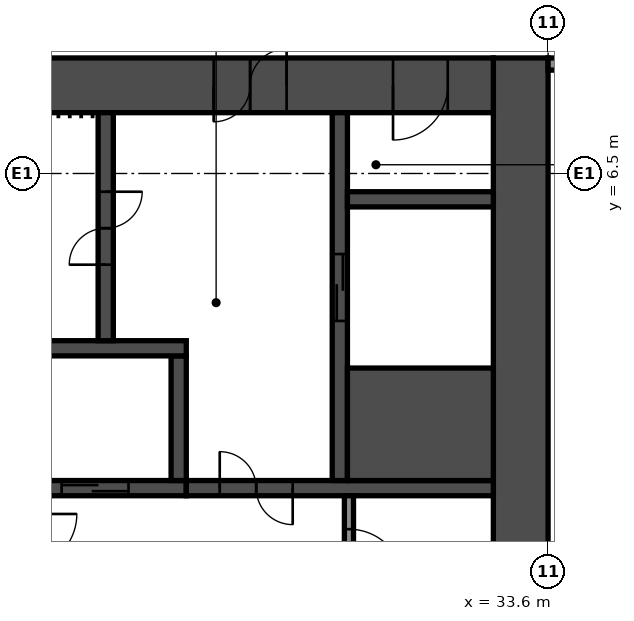
"""IFC4 building model, lengths in metres.
Left out: names, types, materials, properties, quantities, classifications, styles, units other than length and angle.
Written with IfcOpenShell. Run it as: python <this file> out.ifc"""

import sys

from ifc_helpers import new_model, si_unit, direction, frame, frame_2d, origin, place, context, subcontext, project, spatial, rectangle, extrude, element, fill, save


model = new_model("IFC4")
c1 = context("Model", 3, precision=1e-05, world=origin(), true_north=direction((0.0, 1.0)))
c2 = subcontext(c1, "Body", "Model", "MODEL_VIEW")
j1 = project(units=[si_unit("LENGTHUNIT", "METRE"), si_unit("PLANEANGLEUNIT", "RADIAN")], contexts=[c1])
p1 = place(None, origin())
s1 = spatial("IfcSite", under=j1, at=p1, CompositionType="ELEMENT")
p2 = place(p1, origin())
s2 = spatial("IfcBuilding", under=s1, at=p2, CompositionType="ELEMENT")
p3 = place(p2, frame((0.0, 0.0, 110.6)))
s3 = spatial("IfcBuildingStorey", under=s2, at=p3, CompositionType="ELEMENT", Elevation=110.6)
p4 = place(p3, frame((33.15, -8.4, 0.0), z_axis=(0.0, 0.0, 1.0), x_axis=(0.0, 1.0, 0.0)))
e1 = element("IfcWall", 1, at=p4, inside=s3, PredefinedType="SHEAR", context=c2, shape_type="SweptSolid", body=[
    extrude(rectangle(XDim=16.8, YDim=0.9, at=frame_2d((8.4, 0.0))), origin(), (0.0, 0.0, 1.0), 2.8),
])
p5 = place(p3, frame((17.7, 7.95, 0.0), z_axis=(0.0, 0.0, 1.0), x_axis=(1.0, 0.0, 0.0)))
e2 = element("IfcWall", 2, at=p5, inside=s3, PredefinedType="SHEAR", context=c2, shape_type="SweptSolid", body=[
    extrude(rectangle(XDim=15.0, YDim=0.9, at=frame_2d((7.5, 0.0))), origin(), (0.0, 0.0, 1.0), 2.8),
])
p6 = place(p5, frame((10.4, 0.0, 0.0)))
e3 = element("IfcOpeningElement", 3, at=p6, cuts=e2, PredefinedType="OPENING", context=c2, shape_type="SweptSolid", body=[
    extrude(rectangle(XDim=1.2, YDim=2.1, at=frame_2d((0.6, 1.05))), frame((0.0, 0.46, 0.0), z_axis=(0.0, -1.0, 0.0), x_axis=(1.0, 0.0, 0.0)), (0.0, 0.0, 1.0), 0.92),
])
p7 = place(p5, frame((13.35, 0.0, 0.0)))
e4 = element("IfcOpeningElement", 4, at=p7, cuts=e2, PredefinedType="OPENING", context=c2, shape_type="SweptSolid", body=[
    extrude(rectangle(XDim=0.9, YDim=2.1, at=frame_2d((0.45, 1.05))), frame((0.0, 0.46, 0.0), z_axis=(0.0, -1.0, 0.0), x_axis=(1.0, 0.0, 0.0)), (0.0, 0.0, 1.0), 0.92),
])
p8 = place(p3, frame((20.15, 1.325, 0.0), z_axis=(0.0, 0.0, 1.0), x_axis=(1.0, 0.0, 0.0)))
e5 = element("IfcWall", 5, at=p8, inside=s3, PredefinedType="SHEAR", context=c2, shape_type="SweptSolid", body=[
    extrude(rectangle(XDim=7.5, YDim=0.25, at=frame_2d((3.75, 0.0))), origin(), (0.0, 0.0, 1.0), 2.8),
])
p9 = place(p8, frame((0.65, 0.0, 0.0)))
e6 = element("IfcOpeningElement", 6, at=p9, cuts=e5, PredefinedType="OPENING", context=c2, shape_type="SweptSolid", body=[
    extrude(rectangle(XDim=1.1, YDim=2.1, at=frame_2d((0.55, 1.05))), frame((0.0, 0.135, 0.0), z_axis=(0.0, -1.0, 0.0), x_axis=(1.0, 0.0, 0.0)), (0.0, 0.0, 1.0), 0.27),
])
p10 = place(p8, frame((3.05, 0.0, 0.0)))
e7 = element("IfcOpeningElement", 7, at=p10, cuts=e5, PredefinedType="OPENING", context=c2, shape_type="SweptSolid", body=[
    extrude(rectangle(XDim=1.1, YDim=2.1, at=frame_2d((0.55, 1.05))), frame((0.0, 0.135, 0.0), z_axis=(0.0, -1.0, 0.0), x_axis=(1.0, 0.0, 0.0)), (0.0, 0.0, 1.0), 0.27),
])
p11 = place(p8, frame((5.45, 0.0, 0.0)))
e8 = element("IfcOpeningElement", 8, at=p11, cuts=e5, PredefinedType="OPENING", context=c2, shape_type="SweptSolid", body=[
    extrude(rectangle(XDim=1.1, YDim=2.1, at=frame_2d((0.55, 1.05))), frame((0.0, 0.135, 0.0), z_axis=(0.0, -1.0, 0.0), x_axis=(1.0, 0.0, 0.0)), (0.0, 0.0, 1.0), 0.27),
])
p12 = place(p3, frame((27.525, 1.45, 0.0), z_axis=(0.0, 0.0, 1.0), x_axis=(0.0, 1.0, 0.0)))
e9 = element("IfcWall", 9, at=p12, inside=s3, PredefinedType="SHEAR", context=c2, shape_type="SweptSolid", body=[
    extrude(rectangle(XDim=2.05, YDim=0.25, at=frame_2d((1.025, 0.0))), origin(), (0.0, 0.0, 1.0), 2.8),
])
p13 = place(p3, frame((20.15, 3.625, 0.0), z_axis=(0.0, 0.0, 1.0), x_axis=(1.0, 0.0, 0.0)))
e10 = element("IfcWall", 10, at=p13, inside=s3, PredefinedType="SHEAR", context=c2, shape_type="SweptSolid", body=[
    extrude(rectangle(XDim=7.5, YDim=0.25, at=frame_2d((3.75, 0.0))), origin(), (0.0, 0.0, 1.0), 2.8),
])
p14 = place(p3, frame((26.325, 3.75, 0.0), z_axis=(0.0, 0.0, 1.0), x_axis=(0.0, 1.0, 0.0)))
e11 = element("IfcWall", 11, at=p14, inside=s3, PredefinedType="SHEAR", context=c2, shape_type="SweptSolid", body=[
    extrude(rectangle(XDim=3.75, YDim=0.25, at=frame_2d((1.875, 0.0))), origin(), (0.0, 0.0, 1.0), 2.8),
])
p15 = place(p14, frame((1.25, 0.0, 0.0)))
e12 = element("IfcOpeningElement", 12, at=p15, cuts=e11, PredefinedType="OPENING", context=c2, shape_type="SweptSolid", body=[
    extrude(rectangle(XDim=1.2, YDim=2.1, at=frame_2d((0.6, 1.05))), frame((0.0, 0.135, 0.0), z_axis=(0.0, -1.0, 0.0), x_axis=(1.0, 0.0, 0.0)), (0.0, 0.0, 1.0), 0.27),
])
p16 = place(p3, frame((27.65, 1.325, 0.0), z_axis=(0.0, 0.0, 1.0), x_axis=(1.0, 0.0, 0.0)))
e13 = element("IfcWall", 13, at=p16, inside=s3, PredefinedType="SHEAR", context=c2, shape_type="SweptSolid", body=[
    extrude(rectangle(XDim=5.05, YDim=0.25, at=frame_2d((2.525, 0.0))), origin(), (0.0, 0.0, 1.0), 2.8),
])
p17 = place(p16, frame((0.55, 0.0, 0.0)))
e14 = element("IfcOpeningElement", 14, at=p17, cuts=e13, PredefinedType="OPENING", context=c2, shape_type="SweptSolid", body=[
    extrude(rectangle(XDim=1.2, YDim=2.1, at=frame_2d((0.6, 1.05))), frame((0.0, 0.135, 0.0), z_axis=(0.0, -1.0, 0.0), x_axis=(1.0, 0.0, 0.0)), (0.0, 0.0, 1.0), 0.27),
])
p18 = place(p3, frame((30.175, 1.45, 0.0), z_axis=(0.0, 0.0, 1.0), x_axis=(0.0, 1.0, 0.0)))
e15 = element("IfcWall", 15, at=p18, inside=s3, PredefinedType="SHEAR", context=c2, shape_type="SweptSolid", body=[
    extrude(rectangle(XDim=6.05, YDim=0.25, at=frame_2d((3.025, 0.0))), origin(), (0.0, 0.0, 1.0), 2.8),
])
p19 = place(p18, frame((2.625, 0.0, 0.0)))
e16 = element("IfcOpeningElement", 16, at=p19, cuts=e15, PredefinedType="OPENING", context=c2, shape_type="SweptSolid", body=[
    extrude(rectangle(XDim=1.1, YDim=2.1, at=frame_2d((0.55, 1.05))), frame((0.0, 0.135, 0.0), z_axis=(0.0, -1.0, 0.0), x_axis=(1.0, 0.0, 0.0)), (0.0, 0.0, 1.0), 0.27),
])
p20 = place(p3, frame((30.3, 2.375, 0.0), z_axis=(0.0, 0.0, 1.0), x_axis=(1.0, 0.0, 0.0)))
e17 = element("IfcWall", 17, at=p20, inside=s3, PredefinedType="SHEAR", context=c2, shape_type="SweptSolid", body=[
    extrude(rectangle(XDim=2.4, YDim=1.85, at=frame_2d((1.2, 0.0))), origin(), (0.0, 0.0, 1.0), 2.8),
])
p21 = place(p3, frame((30.3, 6.075, 0.0), z_axis=(0.0, 0.0, 1.0), x_axis=(1.0, 0.0, 0.0)))
e18 = element("IfcWall", 18, at=p21, inside=s3, PredefinedType="SHEAR", context=c2, shape_type="SweptSolid", body=[
    extrude(rectangle(XDim=2.4, YDim=0.25, at=frame_2d((1.2, 0.0))), origin(), (0.0, 0.0, 1.0), 2.8),
])
p22 = place(p3, frame((30.325, -0.95, 0.0), z_axis=(0.0, 0.0, 1.0), x_axis=(0.0, 1.0, 0.0)))
e19 = element("IfcWall", 19, at=p22, inside=s3, PredefinedType="PARTITIONING", context=c2, shape_type="SweptSolid", body=[
    extrude(rectangle(XDim=2.15, YDim=0.15, at=frame_2d((1.075, 0.0))), origin(), (0.0, 0.0, 1.0), 2.8),
])
p23 = place(p22, frame((0.7, 0.0, 0.0)))
e20 = element("IfcOpeningElement", 20, at=p23, cuts=e19, PredefinedType="OPENING", context=c2, shape_type="SweptSolid", body=[
    extrude(rectangle(XDim=0.9, YDim=2.1, at=frame_2d((0.45, 1.05))), frame((0.0, 0.085, 0.0), z_axis=(0.0, -1.0, 0.0), x_axis=(1.0, 0.0, 0.0)), (0.0, 0.0, 1.0), 0.17),
])
p24 = place(p3, frame((33.6, 8.3, 0.0), z_axis=(0.0, 0.0, 1.0), x_axis=(1.0, 0.0, 0.0)))
e21 = element("IfcWall", 21, at=p24, inside=s3, PredefinedType="PARTITIONING", context=c2, shape_type="SweptSolid", body=[
    extrude(rectangle(XDim=10.4, YDim=0.2, at=frame_2d((5.2, 0.0))), origin(), (0.0, 0.0, 1.0), 2.8),
])
p25 = place(p24, frame((2.1, 0.0, 0.0)))
e22 = element("IfcOpeningElement", 22, at=p25, cuts=e21, PredefinedType="OPENING", context=c2, shape_type="SweptSolid", body=[
    extrude(rectangle(XDim=1.0, YDim=2.1, at=frame_2d((0.5, 1.05))), frame((0.0, 0.11, 0.0), z_axis=(0.0, -1.0, 0.0), x_axis=(1.0, 0.0, 0.0)), (0.0, 0.0, 1.0), 0.22),
])
p26 = place(p6, origin())
e23 = element("IfcDoor", 23, at=p26, inside=s3, OperationType="DOUBLE_DOOR_SINGLE_SWING", PredefinedType="DOOR", context=c2, shape_type="SweptSolid", body=[
    extrude(rectangle(XDim=1.2, YDim=2.1, at=frame_2d((0.6, 1.05))), frame((0.0, 0.025, 0.0), z_axis=(0.0, -1.0, 0.0), x_axis=(1.0, 0.0, 0.0)), (0.0, 0.0, 1.0), 0.05),
])
fill(e3, e23)
p27 = place(p7, origin())
e24 = element("IfcDoor", 24, at=p27, inside=s3, OperationType="SINGLE_SWING_LEFT", PredefinedType="DOOR", context=c2, shape_type="SweptSolid", body=[
    extrude(rectangle(XDim=0.9, YDim=2.1, at=frame_2d((0.45, 1.05))), frame((0.0, 0.025, 0.0), z_axis=(0.0, -1.0, 0.0), x_axis=(1.0, 0.0, 0.0)), (0.0, 0.0, 1.0), 0.05),
])
fill(e4, e24)
p28 = place(p15, origin())
e25 = element("IfcDoor", 25, at=p28, inside=s3, OperationType="DOUBLE_DOOR_SINGLE_SWING", PredefinedType="DOOR", context=c2, shape_type="SweptSolid", body=[
    extrude(rectangle(XDim=1.2, YDim=2.1, at=frame_2d((0.6, 1.05))), frame((0.0, 0.025, 0.0), z_axis=(0.0, -1.0, 0.0), x_axis=(1.0, 0.0, 0.0)), (0.0, 0.0, 1.0), 0.05),
])
fill(e12, e25)
p29 = place(p17, origin())
e26 = element("IfcDoor", 26, at=p29, inside=s3, OperationType="DOUBLE_DOOR_SINGLE_SWING", PredefinedType="DOOR", context=c2, shape_type="SweptSolid", body=[
    extrude(rectangle(XDim=1.2, YDim=2.1, at=frame_2d((0.6, 1.05))), frame((0.0, 0.025, 0.0), z_axis=(0.0, -1.0, 0.0), x_axis=(1.0, 0.0, 0.0)), (0.0, 0.0, 1.0), 0.05),
])
fill(e14, e26)
p30 = place(p23, origin())
e27 = element("IfcDoor", 27, at=p30, inside=s3, OperationType="SINGLE_SWING_LEFT", PredefinedType="DOOR", context=c2, shape_type="SweptSolid", body=[
    extrude(rectangle(XDim=0.9, YDim=2.1, at=frame_2d((0.45, 1.05))), frame((0.0, 0.025, 0.0), z_axis=(0.0, -1.0, 0.0), x_axis=(1.0, 0.0, 0.0)), (0.0, 0.0, 1.0), 0.05),
])
fill(e20, e27)
p31 = place(p11, origin())
e28 = element("IfcDoor", 28, at=p31, inside=s3, OperationType="DOUBLE_DOOR_SLIDING", PredefinedType="DOOR", context=c2, shape_type="SweptSolid", body=[
    extrude(rectangle(XDim=1.1, YDim=2.1, at=frame_2d((0.55, 1.05))), frame((0.0, 0.025, 0.0), z_axis=(0.0, -1.0, 0.0), x_axis=(1.0, 0.0, 0.0)), (0.0, 0.0, 1.0), 0.05),
])
fill(e8, e28)
p32 = place(p19, origin())
e29 = element("IfcDoor", 29, at=p32, inside=s3, OperationType="DOUBLE_DOOR_SLIDING", PredefinedType="DOOR", context=c2, shape_type="SweptSolid", body=[
    extrude(rectangle(XDim=1.1, YDim=2.1, at=frame_2d((0.55, 1.05))), frame((0.0, 0.025, 0.0), z_axis=(0.0, -1.0, 0.0), x_axis=(1.0, 0.0, 0.0)), (0.0, 0.0, 1.0), 0.05),
])
fill(e16, e29)
save(model, sys.argv[1])
